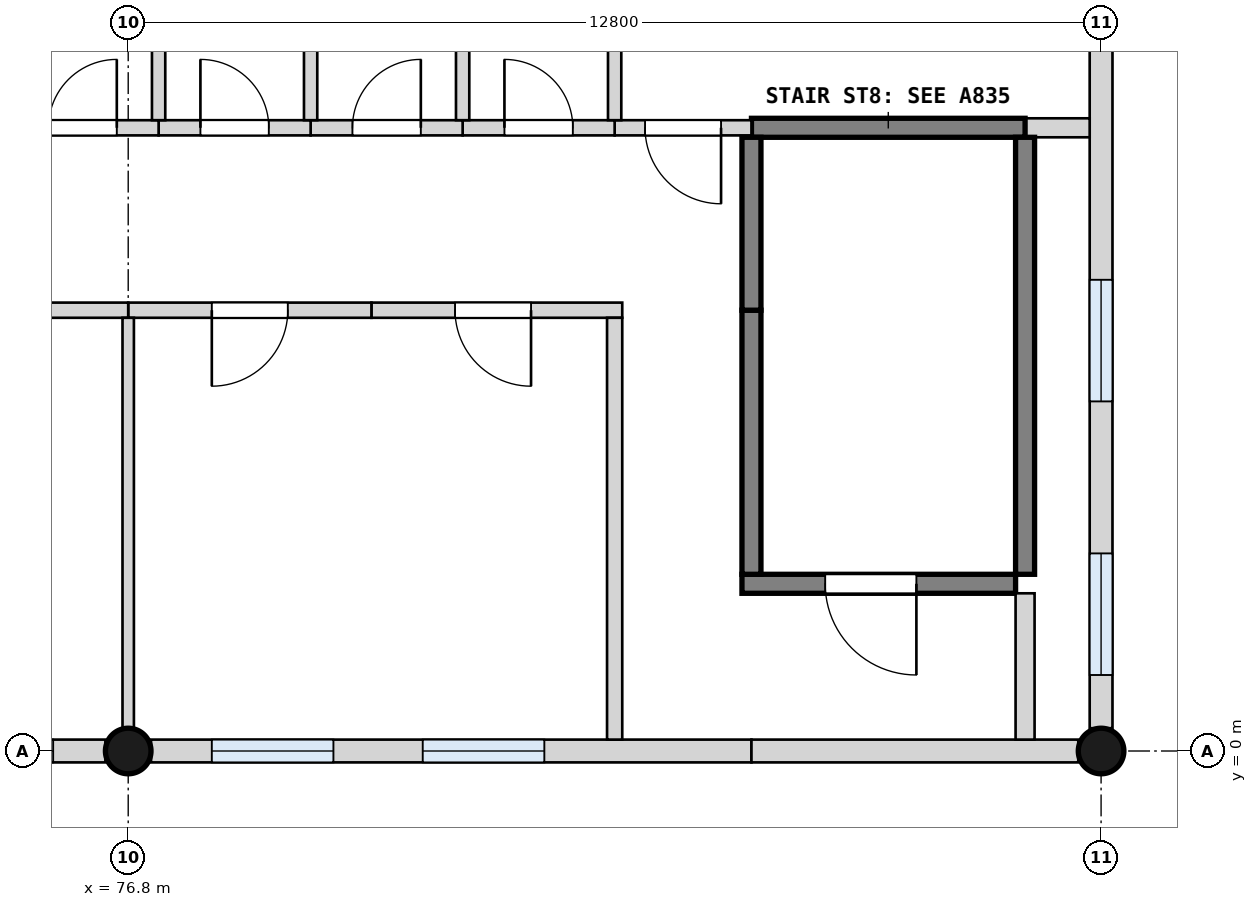
"""IFC4 building model, lengths in metres.
Left out: names, types, materials, properties, quantities, classifications, styles, units other than length and angle.
Written with IfcOpenShell. Run it as: python <this file> out.ifc"""

import sys

from ifc_helpers import new_model, si_unit, direction, frame, frame_2d, origin, origin_2d, place, context, subcontext, project, spatial, rectangle, circle, extrude, element, fill, save


model = new_model("IFC4")
c1 = context("Model", 3, precision=1e-05, world=origin(), true_north=direction((0.0, 1.0)))
c2 = subcontext(c1, "Body", "Model", "MODEL_VIEW")
j1 = project(units=[si_unit("LENGTHUNIT", "METRE"), si_unit("PLANEANGLEUNIT", "RADIAN")], contexts=[c1])
p1 = place(None, origin())
s1 = spatial("IfcSite", under=j1, at=p1, CompositionType="ELEMENT")
p2 = place(p1, origin())
s2 = spatial("IfcBuilding", under=s1, at=p2, CompositionType="ELEMENT")
p3 = place(p2, frame((0.0, 0.0, 4.2)))
s3 = spatial("IfcBuildingStorey", under=s2, at=p3, CompositionType="ELEMENT", Elevation=4.2)
for number, where, z_axis, x_axis in (
    (1, (89.6, 0.0, 0.0), (0.0, 0.0, 1.0), (1.0, 0.0, 0.0)),
    (2, (76.8, 0.0, 0.0), (0.0, 0.0, 1.0), (1.0, 0.0, 0.0)),
):
    element("IfcColumn", number, at=place(p3, frame(where, z_axis=z_axis, x_axis=x_axis)), inside=s3, PredefinedType="COLUMN", context=c2, shape_type="SweptSolid", body=[
        extrude(circle(Radius=0.3, at=origin_2d()), origin(), (0.0, 0.0, 1.0), 4.2),
    ])
p4 = place(p3, frame((64.3, 0.0, 0.0), z_axis=(0.0, 0.0, 1.0), x_axis=(1.0, 0.0, 0.0)))
e3 = element("IfcWall", 3, at=p4, inside=s3, PredefinedType="SOLIDWALL", context=c2, shape_type="SweptSolid", body=[
    extrude(rectangle(XDim=12.2, YDim=0.3, at=frame_2d((6.1, 0.0))), origin(), (0.0, 0.0, 1.0), 3.0),
])
p5 = place(p4, frame((9.913, 0.0, 1.0)))
e4 = element("IfcOpeningElement", 4, at=p5, cuts=e3, PredefinedType="OPENING", context=c2, shape_type="SweptSolid", body=[
    extrude(rectangle(XDim=1.6, YDim=1.8, at=frame_2d((0.8, 0.9))), frame((0.0, 0.16, 0.0), z_axis=(0.0, -1.0, 0.0), x_axis=(1.0, 0.0, 0.0)), (0.0, 0.0, 1.0), 0.32),
])
p6 = place(p4, frame((6.9, 0.0, 1.0)))
e5 = element("IfcOpeningElement", 5, at=p6, cuts=e3, PredefinedType="OPENING", context=c2, shape_type="SweptSolid", body=[
    extrude(rectangle(XDim=1.6, YDim=1.8, at=frame_2d((0.8, 0.9))), frame((0.0, 0.16, 0.0), z_axis=(0.0, -1.0, 0.0), x_axis=(1.0, 0.0, 0.0)), (0.0, 0.0, 1.0), 0.32),
])
p7 = place(p4, frame((3.7, 0.0, 1.0)))
e6 = element("IfcOpeningElement", 6, at=p7, cuts=e3, PredefinedType="OPENING", context=c2, shape_type="SweptSolid", body=[
    extrude(rectangle(XDim=1.6, YDim=1.8, at=frame_2d((0.8, 0.9))), frame((0.0, 0.16, 0.0), z_axis=(0.0, -1.0, 0.0), x_axis=(1.0, 0.0, 0.0)), (0.0, 0.0, 1.0), 0.32),
])
p8 = place(p4, frame((0.688, 0.0, 1.0)))
e7 = element("IfcOpeningElement", 7, at=p8, cuts=e3, PredefinedType="OPENING", context=c2, shape_type="SweptSolid", body=[
    extrude(rectangle(XDim=1.6, YDim=1.8, at=frame_2d((0.8, 0.9))), frame((0.0, 0.16, 0.0), z_axis=(0.0, -1.0, 0.0), x_axis=(1.0, 0.0, 0.0)), (0.0, 0.0, 1.0), 0.32),
])
p9 = place(p3, frame((77.1, 0.0, 0.0), z_axis=(0.0, 0.0, 1.0), x_axis=(1.0, 0.0, 0.0)))
e8 = element("IfcWall", 8, at=p9, inside=s3, PredefinedType="SOLIDWALL", context=c2, shape_type="SweptSolid", body=[
    extrude(rectangle(XDim=7.9, YDim=0.3, at=frame_2d((3.95, 0.0))), origin(), (0.0, 0.0, 1.0), 3.0),
])
p10 = place(p9, frame((3.575, 0.0, 1.0)))
e9 = element("IfcOpeningElement", 9, at=p10, cuts=e8, PredefinedType="OPENING", context=c2, shape_type="SweptSolid", body=[
    extrude(rectangle(XDim=1.6, YDim=1.8, at=frame_2d((0.8, 0.9))), frame((0.0, 0.16, 0.0), z_axis=(0.0, -1.0, 0.0), x_axis=(1.0, 0.0, 0.0)), (0.0, 0.0, 1.0), 0.32),
])
p11 = place(p9, frame((0.8, 0.0, 1.0)))
e10 = element("IfcOpeningElement", 10, at=p11, cuts=e8, PredefinedType="OPENING", context=c2, shape_type="SweptSolid", body=[
    extrude(rectangle(XDim=1.6, YDim=1.8, at=frame_2d((0.8, 0.9))), frame((0.0, 0.16, 0.0), z_axis=(0.0, -1.0, 0.0), x_axis=(1.0, 0.0, 0.0)), (0.0, 0.0, 1.0), 0.32),
])
p12 = place(p3, frame((85.0, 0.0, 0.0), z_axis=(0.0, 0.0, 1.0), x_axis=(1.0, 0.0, 0.0)))
e11 = element("IfcWall", 11, at=p12, inside=s3, PredefinedType="SOLIDWALL", context=c2, shape_type="SweptSolid", body=[
    extrude(rectangle(XDim=4.3, YDim=0.3, at=frame_2d((2.15, 0.0))), origin(), (0.0, 0.0, 1.0), 3.0),
])
p13 = place(p3, frame((89.6, 0.3, 0.0), z_axis=(0.0, 0.0, 1.0), x_axis=(0.0, 1.0, 0.0)))
e12 = element("IfcWall", 12, at=p13, inside=s3, PredefinedType="SOLIDWALL", context=c2, shape_type="SweptSolid", body=[
    extrude(rectangle(XDim=13.8, YDim=0.3, at=frame_2d((6.9, 0.0))), origin(), (0.0, 0.0, 1.0), 2.9),
])
p14 = place(p13, frame((0.7, 0.0, 1.0)))
e13 = element("IfcOpeningElement", 13, at=p14, cuts=e12, PredefinedType="OPENING", context=c2, shape_type="SweptSolid", body=[
    extrude(rectangle(XDim=1.6, YDim=1.8, at=frame_2d((0.8, 0.9))), frame((0.0, 0.16, 0.0), z_axis=(0.0, -1.0, 0.0), x_axis=(1.0, 0.0, 0.0)), (0.0, 0.0, 1.0), 0.32),
])
p15 = place(p13, frame((4.3, 0.0, 1.0)))
e14 = element("IfcOpeningElement", 14, at=p15, cuts=e12, PredefinedType="OPENING", context=c2, shape_type="SweptSolid", body=[
    extrude(rectangle(XDim=1.6, YDim=1.8, at=frame_2d((0.8, 0.9))), frame((0.0, 0.16, 0.0), z_axis=(0.0, -1.0, 0.0), x_axis=(1.0, 0.0, 0.0)), (0.0, 0.0, 1.0), 0.32),
])
p16 = place(p13, frame((11.5, 0.0, 1.0)))
e15 = element("IfcOpeningElement", 15, at=p16, cuts=e12, PredefinedType="OPENING", context=c2, shape_type="SweptSolid", body=[
    extrude(rectangle(XDim=1.6, YDim=1.8, at=frame_2d((0.8, 0.9))), frame((0.0, 0.16, 0.0), z_axis=(0.0, -1.0, 0.0), x_axis=(1.0, 0.0, 0.0)), (0.0, 0.0, 1.0), 0.32),
])
p17 = place(p3, frame((88.475, 2.2, 0.0), z_axis=(0.0, 0.0, 1.0), x_axis=(-1.0, 0.0, 0.0)))
e16 = element("IfcWall", 16, at=p17, inside=s3, PredefinedType="SHEAR", context=c2, shape_type="SweptSolid", body=[
    extrude(rectangle(XDim=3.6, YDim=0.25, at=frame_2d((1.8, 0.0))), origin(), (0.0, 0.0, 1.0), 3.9),
])
p18 = place(p17, frame((1.305, 0.0, 0.0)))
e17 = element("IfcOpeningElement", 17, at=p18, cuts=e16, PredefinedType="OPENING", context=c2, shape_type="SweptSolid", body=[
    extrude(rectangle(XDim=1.2, YDim=2.1, at=frame_2d((0.6, 1.05))), frame((0.0, 0.135, 0.0), z_axis=(0.0, -1.0, 0.0), x_axis=(1.0, 0.0, 0.0)), (0.0, 0.0, 1.0), 0.27),
])
p19 = place(p3, frame((83.3, 5.8, 0.0), z_axis=(0.0, 0.0, 1.0), x_axis=(-1.0, 0.0, 0.0)))
e18 = element("IfcWall", 18, at=p19, inside=s3, PredefinedType="PARTITIONING", context=c2, shape_type="SweptSolid", body=[
    extrude(rectangle(XDim=3.3, YDim=0.2, at=frame_2d((1.65, 0.0))), origin(), (0.0, 0.0, 1.0), 3.9),
])
p20 = place(p19, frame((1.2, 0.0, 0.0)))
e19 = element("IfcOpeningElement", 19, at=p20, cuts=e18, PredefinedType="OPENING", context=c2, shape_type="SweptSolid", body=[
    extrude(rectangle(XDim=1.0, YDim=2.1, at=frame_2d((0.5, 1.05))), frame((0.0, 0.11, 0.0), z_axis=(0.0, -1.0, 0.0), x_axis=(1.0, 0.0, 0.0)), (0.0, 0.0, 1.0), 0.22),
])
p21 = place(p3, frame((80.0, 5.8, 0.0), z_axis=(0.0, 0.0, 1.0), x_axis=(-1.0, 0.0, 0.0)))
e20 = element("IfcWall", 20, at=p21, inside=s3, PredefinedType="PARTITIONING", context=c2, shape_type="SweptSolid", body=[
    extrude(rectangle(XDim=3.2, YDim=0.2, at=frame_2d((1.6, 0.0))), origin(), (0.0, 0.0, 1.0), 3.9),
])
p22 = place(p21, frame((1.1, 0.0, 0.0)))
e21 = element("IfcOpeningElement", 21, at=p22, cuts=e20, PredefinedType="OPENING", context=c2, shape_type="SweptSolid", body=[
    extrude(rectangle(XDim=1.0, YDim=2.1, at=frame_2d((0.5, 1.05))), frame((0.0, 0.11, 0.0), z_axis=(0.0, -1.0, 0.0), x_axis=(1.0, 0.0, 0.0)), (0.0, 0.0, 1.0), 0.22),
])
p23 = place(p3, frame((76.8, 5.8, 0.0), z_axis=(0.0, 0.0, 1.0), x_axis=(-1.0, 0.0, 0.0)))
e22 = element("IfcWall", 22, at=p23, inside=s3, PredefinedType="PARTITIONING", context=c2, shape_type="SweptSolid", body=[
    extrude(rectangle(XDim=3.2, YDim=0.2, at=frame_2d((1.6, 0.0))), origin(), (0.0, 0.0, 1.0), 3.9),
])
p24 = place(p23, frame((1.1, 0.0, 0.0)))
e23 = element("IfcOpeningElement", 23, at=p24, cuts=e22, PredefinedType="OPENING", context=c2, shape_type="SweptSolid", body=[
    extrude(rectangle(XDim=1.0, YDim=2.1, at=frame_2d((0.5, 1.05))), frame((0.0, 0.11, 0.0), z_axis=(0.0, -1.0, 0.0), x_axis=(1.0, 0.0, 0.0)), (0.0, 0.0, 1.0), 0.22),
])
p25 = place(p3, frame((89.45, 8.2, 0.0), z_axis=(0.0, 0.0, 1.0), x_axis=(-1.0, 0.0, 0.0)))
e24 = element("IfcWall", 24, at=p25, inside=s3, PredefinedType="PARTITIONING", context=c2, shape_type="SweptSolid", body=[
    extrude(rectangle(XDim=0.85, YDim=0.25, at=frame_2d((0.425, 0.0))), origin(), (0.0, 0.0, 1.0), 3.9),
])
p26 = place(p3, frame((88.6, 8.2, 0.0), z_axis=(0.0, 0.0, 1.0), x_axis=(-1.0, 0.0, 0.0)))
e25 = element("IfcWall", 25, at=p26, inside=s3, PredefinedType="SHEAR", context=c2, shape_type="SweptSolid", body=[
    extrude(rectangle(XDim=3.6, YDim=0.25, at=frame_2d((1.8, 0.0))), origin(), (0.0, 0.0, 1.0), 3.9),
])
p27 = place(p3, frame((85.0, 8.2, 0.0), z_axis=(0.0, 0.0, 1.0), x_axis=(-1.0, 0.0, 0.0)))
e26 = element("IfcWall", 26, at=p27, inside=s3, PredefinedType="PARTITIONING", context=c2, shape_type="SweptSolid", body=[
    extrude(rectangle(XDim=1.8, YDim=0.2, at=frame_2d((0.9, 0.0))), origin(), (0.0, 0.0, 1.0), 3.9),
])
p28 = place(p27, frame((0.4, 0.0, 0.0)))
e27 = element("IfcOpeningElement", 27, at=p28, cuts=e26, PredefinedType="OPENING", context=c2, shape_type="SweptSolid", body=[
    extrude(rectangle(XDim=1.0, YDim=2.1, at=frame_2d((0.5, 1.05))), frame((0.0, 0.11, 0.0), z_axis=(0.0, -1.0, 0.0), x_axis=(1.0, 0.0, 0.0)), (0.0, 0.0, 1.0), 0.22),
])
p29 = place(p3, frame((83.2, 8.2, 0.0), z_axis=(0.0, 0.0, 1.0), x_axis=(-1.0, 0.0, 0.0)))
e28 = element("IfcWall", 28, at=p29, inside=s3, PredefinedType="PARTITIONING", context=c2, shape_type="SweptSolid", body=[
    extrude(rectangle(XDim=2.0, YDim=0.2, at=frame_2d((1.0, 0.0))), origin(), (0.0, 0.0, 1.0), 3.9),
])
p30 = place(p29, frame((0.55, 0.0, 0.0)))
e29 = element("IfcOpeningElement", 29, at=p30, cuts=e28, PredefinedType="OPENING", context=c2, shape_type="SweptSolid", body=[
    extrude(rectangle(XDim=0.9, YDim=2.1, at=frame_2d((0.45, 1.05))), frame((0.0, 0.11, 0.0), z_axis=(0.0, -1.0, 0.0), x_axis=(1.0, 0.0, 0.0)), (0.0, 0.0, 1.0), 0.22),
])
p31 = place(p3, frame((81.2, 8.2, 0.0), z_axis=(0.0, 0.0, 1.0), x_axis=(-1.0, 0.0, 0.0)))
e30 = element("IfcWall", 30, at=p31, inside=s3, PredefinedType="PARTITIONING", context=c2, shape_type="SweptSolid", body=[
    extrude(rectangle(XDim=2.0, YDim=0.2, at=frame_2d((1.0, 0.0))), origin(), (0.0, 0.0, 1.0), 3.9),
])
p32 = place(p31, frame((0.55, 0.0, 0.0)))
e31 = element("IfcOpeningElement", 31, at=p32, cuts=e30, PredefinedType="OPENING", context=c2, shape_type="SweptSolid", body=[
    extrude(rectangle(XDim=0.9, YDim=2.1, at=frame_2d((0.45, 1.05))), frame((0.0, 0.11, 0.0), z_axis=(0.0, -1.0, 0.0), x_axis=(1.0, 0.0, 0.0)), (0.0, 0.0, 1.0), 0.22),
])
p33 = place(p3, frame((79.2, 8.2, 0.0), z_axis=(0.0, 0.0, 1.0), x_axis=(-1.0, 0.0, 0.0)))
e32 = element("IfcWall", 32, at=p33, inside=s3, PredefinedType="PARTITIONING", context=c2, shape_type="SweptSolid", body=[
    extrude(rectangle(XDim=2.0, YDim=0.2, at=frame_2d((1.0, 0.0))), origin(), (0.0, 0.0, 1.0), 3.9),
])
p34 = place(p33, frame((0.55, 0.0, 0.0)))
e33 = element("IfcOpeningElement", 33, at=p34, cuts=e32, PredefinedType="OPENING", context=c2, shape_type="SweptSolid", body=[
    extrude(rectangle(XDim=0.9, YDim=2.1, at=frame_2d((0.45, 1.05))), frame((0.0, 0.11, 0.0), z_axis=(0.0, -1.0, 0.0), x_axis=(1.0, 0.0, 0.0)), (0.0, 0.0, 1.0), 0.22),
])
p35 = place(p3, frame((77.2, 8.2, 0.0), z_axis=(0.0, 0.0, 1.0), x_axis=(-1.0, 0.0, 0.0)))
e34 = element("IfcWall", 34, at=p35, inside=s3, PredefinedType="PARTITIONING", context=c2, shape_type="SweptSolid", body=[
    extrude(rectangle(XDim=2.0, YDim=0.2, at=frame_2d((1.0, 0.0))), origin(), (0.0, 0.0, 1.0), 3.9),
])
p36 = place(p35, frame((0.55, 0.0, 0.0)))
e35 = element("IfcOpeningElement", 35, at=p36, cuts=e34, PredefinedType="OPENING", context=c2, shape_type="SweptSolid", body=[
    extrude(rectangle(XDim=0.9, YDim=2.1, at=frame_2d((0.45, 1.05))), frame((0.0, 0.11, 0.0), z_axis=(0.0, -1.0, 0.0), x_axis=(1.0, 0.0, 0.0)), (0.0, 0.0, 1.0), 0.22),
])
p37 = place(p3, frame((88.6, 0.15, 0.0), z_axis=(0.0, 0.0, 1.0), x_axis=(0.0, 1.0, 0.0)))
e36 = element("IfcWall", 36, at=p37, inside=s3, PredefinedType="PARTITIONING", context=c2, shape_type="SweptSolid", body=[
    extrude(rectangle(XDim=1.925, YDim=0.25, at=frame_2d((0.962, 0.0))), origin(), (0.0, 0.0, 1.0), 3.9),
])
p38 = place(p3, frame((88.6, 2.325, 0.0), z_axis=(0.0, 0.0, 1.0), x_axis=(0.0, 1.0, 0.0)))
e37 = element("IfcWall", 37, at=p38, inside=s3, PredefinedType="SHEAR", context=c2, shape_type="SweptSolid", body=[
    extrude(rectangle(XDim=5.75, YDim=0.25, at=frame_2d((2.875, 0.0))), origin(), (0.0, 0.0, 1.0), 3.9),
])
p39 = place(p3, frame((85.0, 2.325, 0.0), z_axis=(0.0, 0.0, 1.0), x_axis=(0.0, 1.0, 0.0)))
e38 = element("IfcWall", 38, at=p39, inside=s3, PredefinedType="SHEAR", context=c2, shape_type="SweptSolid", body=[
    extrude(rectangle(XDim=3.475, YDim=0.25, at=frame_2d((1.738, 0.0))), origin(), (0.0, 0.0, 1.0), 3.9),
])
p40 = place(p3, frame((85.0, 5.8, 0.0), z_axis=(0.0, 0.0, 1.0), x_axis=(0.0, 1.0, 0.0)))
e39 = element("IfcWall", 39, at=p40, inside=s3, PredefinedType="SHEAR", context=c2, shape_type="SweptSolid", body=[
    extrude(rectangle(XDim=2.275, YDim=0.25, at=frame_2d((1.137, 0.0))), origin(), (0.0, 0.0, 1.0), 3.9),
])
p41 = place(p3, frame((83.2, 0.15, 0.0), z_axis=(0.0, 0.0, 1.0), x_axis=(0.0, 1.0, 0.0)))
e40 = element("IfcWall", 40, at=p41, inside=s3, PredefinedType="PARTITIONING", context=c2, shape_type="SweptSolid", body=[
    extrude(rectangle(XDim=5.55, YDim=0.2, at=frame_2d((2.775, 0.0))), origin(), (0.0, 0.0, 1.0), 2.9),
])
p42 = place(p3, frame((83.2, 8.3, 0.0), z_axis=(0.0, 0.0, 1.0), x_axis=(0.0, 1.0, 0.0)))
e41 = element("IfcWall", 41, at=p42, inside=s3, PredefinedType="PARTITIONING", context=c2, shape_type="SweptSolid", body=[
    extrude(rectangle(XDim=3.012, YDim=0.175, at=frame_2d((1.506, 0.0))), origin(), (0.0, 0.0, 1.0), 2.9),
])
for number, where, z_axis, x_axis in (
    (42, (81.2, 8.3, 0.0), (0.0, 0.0, 1.0), (0.0, 1.0, 0.0)),
    (43, (79.2, 8.3, 0.0), (0.0, 0.0, 1.0), (0.0, 1.0, 0.0)),
    (44, (77.2, 8.3, 0.0), (0.0, 0.0, 1.0), (0.0, 1.0, 0.0)),
):
    element("IfcWall", number, at=place(p3, frame(where, z_axis=z_axis, x_axis=x_axis)), inside=s3, PredefinedType="PARTITIONING", context=c2, shape_type="SweptSolid", body=[
        extrude(rectangle(XDim=3.012, YDim=0.175, at=frame_2d((1.506, 0.0))), origin(), (0.0, 0.0, 1.0), 3.9),
    ])
p43 = place(p3, frame((76.8, 0.27, 0.0), z_axis=(0.0, 0.0, 1.0), x_axis=(0.0, 1.0, 0.0)))
e45 = element("IfcWall", 45, at=p43, inside=s3, PredefinedType="PARTITIONING", context=c2, shape_type="SweptSolid", body=[
    extrude(rectangle(XDim=5.43, YDim=0.15, at=frame_2d((2.715, 0.0))), origin(), (0.0, 0.0, 1.0), 2.9),
])
p44 = place(p18, origin())
e46 = element("IfcDoor", 46, at=p44, inside=s3, OperationType="SINGLE_SWING_LEFT", PredefinedType="DOOR", context=c2, shape_type="SweptSolid", body=[
    extrude(rectangle(XDim=1.2, YDim=2.1, at=frame_2d((0.6, 1.05))), frame((0.0, 0.025, 0.0), z_axis=(0.0, -1.0, 0.0), x_axis=(1.0, 0.0, 0.0)), (0.0, 0.0, 1.0), 0.05),
])
fill(e17, e46)
p45 = place(p20, origin())
e47 = element("IfcDoor", 47, at=p45, inside=s3, OperationType="SINGLE_SWING_LEFT", PredefinedType="DOOR", context=c2, shape_type="SweptSolid", body=[
    extrude(rectangle(XDim=1.0, YDim=2.1, at=frame_2d((0.5, 1.05))), frame((0.0, 0.025, 0.0), z_axis=(0.0, -1.0, 0.0), x_axis=(1.0, 0.0, 0.0)), (0.0, 0.0, 1.0), 0.05),
])
fill(e19, e47)
p46 = place(p22, origin())
e48 = element("IfcDoor", 48, at=p46, inside=s3, OperationType="SINGLE_SWING_RIGHT", PredefinedType="DOOR", context=c2, shape_type="SweptSolid", body=[
    extrude(rectangle(XDim=1.0, YDim=2.1, at=frame_2d((0.5, 1.05))), frame((0.0, 0.025, 0.0), z_axis=(0.0, -1.0, 0.0), x_axis=(1.0, 0.0, 0.0)), (0.0, 0.0, 1.0), 0.05),
])
fill(e21, e48)
p47 = place(p30, frame((0.9, 0.0, 0.0), z_axis=(0.0, 0.0, 1.0), x_axis=(-1.0, 0.0, 0.0)))
e49 = element("IfcDoor", 49, at=p47, inside=s3, OperationType="SINGLE_SWING_LEFT", PredefinedType="DOOR", context=c2, shape_type="SweptSolid", body=[
    extrude(rectangle(XDim=0.9, YDim=2.1, at=frame_2d((0.45, 1.05))), frame((0.0, 0.025, 0.0), z_axis=(0.0, -1.0, 0.0), x_axis=(1.0, 0.0, 0.0)), (0.0, 0.0, 1.0), 0.05),
])
fill(e29, e49)
p48 = place(p32, frame((0.9, 0.0, 0.0), z_axis=(0.0, 0.0, 1.0), x_axis=(-1.0, 0.0, 0.0)))
e50 = element("IfcDoor", 50, at=p48, inside=s3, OperationType="SINGLE_SWING_RIGHT", PredefinedType="DOOR", context=c2, shape_type="SweptSolid", body=[
    extrude(rectangle(XDim=0.9, YDim=2.1, at=frame_2d((0.45, 1.05))), frame((0.0, 0.025, 0.0), z_axis=(0.0, -1.0, 0.0), x_axis=(1.0, 0.0, 0.0)), (0.0, 0.0, 1.0), 0.05),
])
fill(e31, e50)
p49 = place(p34, frame((0.9, 0.0, 0.0), z_axis=(0.0, 0.0, 1.0), x_axis=(-1.0, 0.0, 0.0)))
e51 = element("IfcDoor", 51, at=p49, inside=s3, OperationType="SINGLE_SWING_LEFT", PredefinedType="DOOR", context=c2, shape_type="SweptSolid", body=[
    extrude(rectangle(XDim=0.9, YDim=2.1, at=frame_2d((0.45, 1.05))), frame((0.0, 0.025, 0.0), z_axis=(0.0, -1.0, 0.0), x_axis=(1.0, 0.0, 0.0)), (0.0, 0.0, 1.0), 0.05),
])
fill(e33, e51)
p50 = place(p36, frame((0.9, 0.0, 0.0), z_axis=(0.0, 0.0, 1.0), x_axis=(-1.0, 0.0, 0.0)))
e52 = element("IfcDoor", 52, at=p50, inside=s3, OperationType="SINGLE_SWING_RIGHT", PredefinedType="DOOR", context=c2, shape_type="SweptSolid", body=[
    extrude(rectangle(XDim=0.9, YDim=2.1, at=frame_2d((0.45, 1.05))), frame((0.0, 0.025, 0.0), z_axis=(0.0, -1.0, 0.0), x_axis=(1.0, 0.0, 0.0)), (0.0, 0.0, 1.0), 0.05),
])
fill(e35, e52)
p51 = place(p28, origin())
e53 = element("IfcDoor", 53, at=p51, inside=s3, OperationType="SINGLE_SWING_LEFT", PredefinedType="DOOR", context=c2, shape_type="SweptSolid", body=[
    extrude(rectangle(XDim=1.0, YDim=2.1, at=frame_2d((0.5, 1.05))), frame((0.0, 0.025, 0.0), z_axis=(0.0, -1.0, 0.0), x_axis=(1.0, 0.0, 0.0)), (0.0, 0.0, 1.0), 0.05),
])
fill(e27, e53)
p52 = place(p5, origin())
e54 = element("IfcWindow", 54, at=p52, inside=s3, PartitioningType="SINGLE_PANEL", PredefinedType="WINDOW", context=c2, shape_type="SweptSolid", body=[
    extrude(rectangle(XDim=1.6, YDim=1.8, at=frame_2d((0.8, 0.9))), frame((0.0, 0.03, 0.0), z_axis=(0.0, -1.0, 0.0), x_axis=(1.0, 0.0, 0.0)), (0.0, 0.0, 1.0), 0.06),
])
fill(e4, e54)
p53 = place(p10, origin())
e55 = element("IfcWindow", 55, at=p53, inside=s3, PartitioningType="SINGLE_PANEL", PredefinedType="WINDOW", context=c2, shape_type="SweptSolid", body=[
    extrude(rectangle(XDim=1.6, YDim=1.8, at=frame_2d((0.8, 0.9))), frame((0.0, 0.03, 0.0), z_axis=(0.0, -1.0, 0.0), x_axis=(1.0, 0.0, 0.0)), (0.0, 0.0, 1.0), 0.06),
])
fill(e9, e55)
p54 = place(p11, origin())
e56 = element("IfcWindow", 56, at=p54, inside=s3, PartitioningType="SINGLE_PANEL", PredefinedType="WINDOW", context=c2, shape_type="SweptSolid", body=[
    extrude(rectangle(XDim=1.6, YDim=1.8, at=frame_2d((0.8, 0.9))), frame((0.0, 0.03, 0.0), z_axis=(0.0, -1.0, 0.0), x_axis=(1.0, 0.0, 0.0)), (0.0, 0.0, 1.0), 0.06),
])
fill(e10, e56)
p55 = place(p14, origin())
e57 = element("IfcWindow", 57, at=p55, inside=s3, PartitioningType="SINGLE_PANEL", PredefinedType="WINDOW", context=c2, shape_type="SweptSolid", body=[
    extrude(rectangle(XDim=1.6, YDim=1.8, at=frame_2d((0.8, 0.9))), frame((0.0, 0.03, 0.0), z_axis=(0.0, -1.0, 0.0), x_axis=(1.0, 0.0, 0.0)), (0.0, 0.0, 1.0), 0.06),
])
fill(e13, e57)
p56 = place(p15, origin())
e58 = element("IfcWindow", 58, at=p56, inside=s3, PartitioningType="SINGLE_PANEL", PredefinedType="WINDOW", context=c2, shape_type="SweptSolid", body=[
    extrude(rectangle(XDim=1.6, YDim=1.8, at=frame_2d((0.8, 0.9))), frame((0.0, 0.03, 0.0), z_axis=(0.0, -1.0, 0.0), x_axis=(1.0, 0.0, 0.0)), (0.0, 0.0, 1.0), 0.06),
])
fill(e14, e58)
save(model, sys.argv[1])
